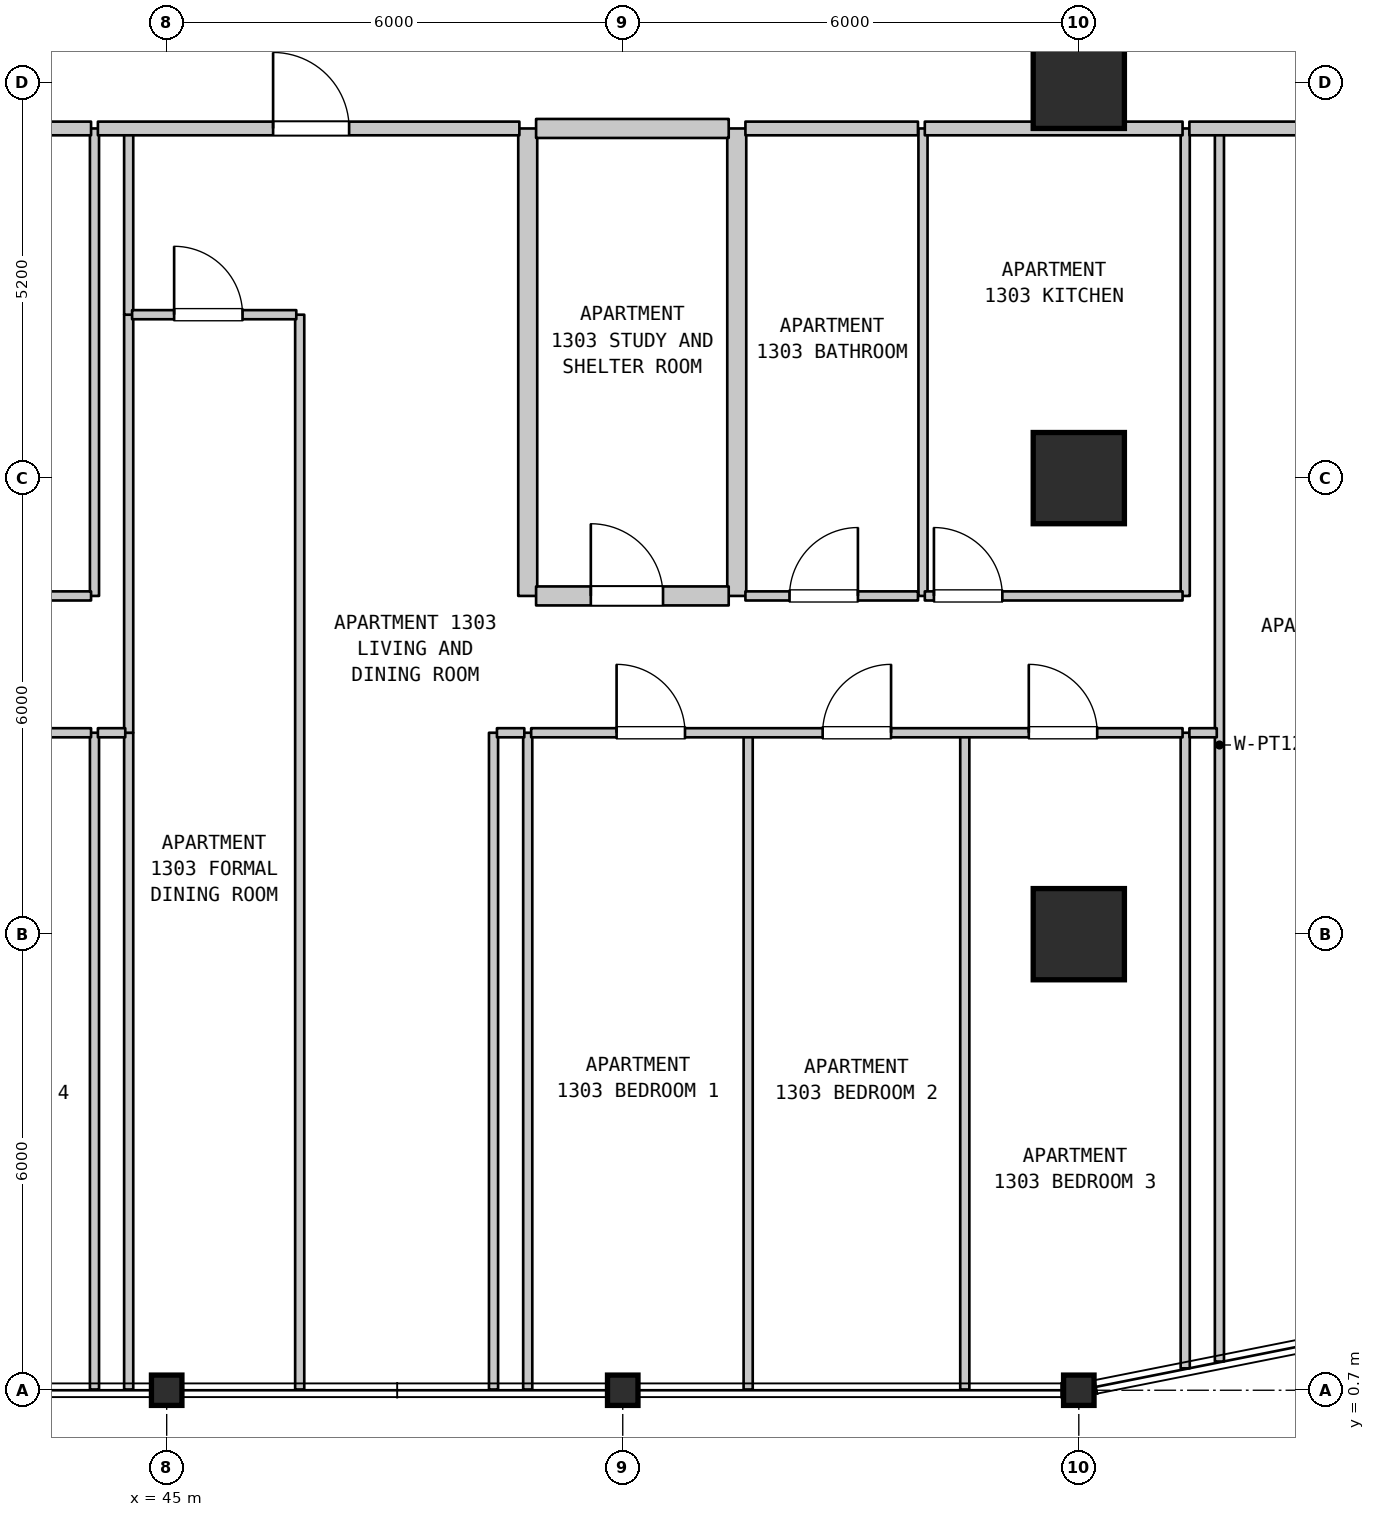
"""IFC4 building model, lengths in metres.
Left out: names, types, materials, properties, quantities, classifications, styles, units other than length and angle.
Written with IfcOpenShell. Run it as: python <this file> out.ifc"""

import sys

from ifc_helpers import new_model, si_unit, direction, frame, frame_2d, origin, origin_2d, place, context, subcontext, project, spatial, rectangle, i_section, extrude, element, fill, save


model = new_model("IFC4")
c1 = context("Model", 3, precision=1e-05, world=origin(), true_north=direction((0.0, 1.0)))
c2 = subcontext(c1, "Body", "Model", "MODEL_VIEW")
j1 = project(units=[si_unit("LENGTHUNIT", "METRE"), si_unit("PLANEANGLEUNIT", "RADIAN")], contexts=[c1])
p1 = place(None, origin())
s1 = spatial("IfcSite", under=j1, at=p1, CompositionType="ELEMENT")
p2 = place(p1, origin())
s2 = spatial("IfcBuilding", under=s1, at=p2, CompositionType="ELEMENT")
p3 = place(p2, frame((0.0, 0.0, 57.3)))
s3 = spatial("IfcBuildingStorey", under=s2, at=p3, CompositionType="ELEMENT", Elevation=57.3)
for number, where, z_axis, x_axis in (
    (1, (45.0, 0.7, 0.0), (0.0, 0.0, 1.0), (1.0, 0.0, 0.0)),
    (2, (51.0, 0.7, 0.0), (0.0, 0.0, 1.0), (1.0, 0.0, 0.0)),
    (3, (57.0, 0.7, 0.0), (0.0, 0.0, 1.0), (1.0, 0.0, 0.0)),
):
    element("IfcColumn", number, at=place(p3, frame(where, z_axis=z_axis, x_axis=x_axis)), inside=s3, PredefinedType="COLUMN", context=c2, shape_type="SweptSolid", body=[
        extrude(i_section(OverallWidth=0.401, OverallDepth=0.399, WebThickness=0.025, FlangeThickness=0.04, FilletRadius=0.015, at=origin_2d()), origin(), (0.0, 0.0, 1.0), 3.7),
    ])
for number, where, z_axis, x_axis in (
    (4, (57.0, 6.7, 0.0), (0.0, 0.0, 1.0), (1.0, 0.0, 0.0)),
    (5, (57.0, 12.7, 0.0), (0.0, 0.0, 1.0), (1.0, 0.0, 0.0)),
    (6, (57.0, 17.9, 0.0), (0.0, 0.0, 1.0), (1.0, 0.0, 0.0)),
):
    element("IfcColumn", number, at=place(p3, frame(where, z_axis=z_axis, x_axis=x_axis)), inside=s3, PredefinedType="COLUMN", context=c2, shape_type="SweptSolid", body=[
        extrude(rectangle(XDim=1.2, YDim=1.2, at=origin_2d()), origin(), (0.0, 0.0, 1.0), 3.7),
    ])
p4 = place(p3, frame((44.05, 0.71, 0.0), z_axis=(0.0, 0.0, 1.0), x_axis=(0.0, 1.0, 0.0)))
e7 = element("IfcWall", 7, at=p4, inside=s3, PredefinedType="PARTITIONING", context=c2, shape_type="SweptSolid", body=[
    extrude(rectangle(XDim=8.64, YDim=0.12, at=frame_2d((4.32, 0.0))), origin(), (0.0, 0.0, 1.0), 3.28),
])
p5 = place(p3, frame((44.05, 11.15, 0.0), z_axis=(0.0, 0.0, 1.0), x_axis=(0.0, 1.0, 0.0)))
e8 = element("IfcWall", 8, at=p5, inside=s3, PredefinedType="PARTITIONING", context=c2, shape_type="SweptSolid", body=[
    extrude(rectangle(XDim=6.15, YDim=0.12, at=frame_2d((3.075, 0.0))), origin(), (0.0, 0.0, 1.0), 3.28),
])
p6 = place(p3, frame((44.5, 0.71, 0.0), z_axis=(0.0, 0.0, 1.0), x_axis=(0.0, 1.0, 0.0)))
e9 = element("IfcWall", 9, at=p6, inside=s3, PredefinedType="PARTITIONING", context=c2, shape_type="SweptSolid", body=[
    extrude(rectangle(XDim=8.64, YDim=0.12, at=frame_2d((4.32, 0.0))), origin(), (0.0, 0.0, 1.0), 3.28),
])
p7 = place(p3, frame((44.5, 9.35, 0.0), z_axis=(0.0, 0.0, 1.0), x_axis=(0.0, 1.0, 0.0)))
e10 = element("IfcWall", 10, at=p7, inside=s3, PredefinedType="PARTITIONING", context=c2, shape_type="SweptSolid", body=[
    extrude(rectangle(XDim=5.5, YDim=0.12, at=frame_2d((2.75, 0.0))), origin(), (0.0, 0.0, 1.0), 3.28),
])
p8 = place(p3, frame((44.5, 14.85, 0.0), z_axis=(0.0, 0.0, 1.0), x_axis=(0.0, 1.0, 0.0)))
e11 = element("IfcWall", 11, at=p8, inside=s3, PredefinedType="PARTITIONING", context=c2, shape_type="SweptSolid", body=[
    extrude(rectangle(XDim=2.45, YDim=0.12, at=frame_2d((1.225, 0.0))), origin(), (0.0, 0.0, 1.0), 3.28),
])
p9 = place(p3, frame((46.75, 0.71, 0.0), z_axis=(0.0, 0.0, 1.0), x_axis=(0.0, 1.0, 0.0)))
e12 = element("IfcWall", 12, at=p9, inside=s3, PredefinedType="PARTITIONING", context=c2, shape_type="SweptSolid", body=[
    extrude(rectangle(XDim=14.14, YDim=0.12, at=frame_2d((7.07, 0.0))), origin(), (0.0, 0.0, 1.0), 3.28),
])
for number, where, z_axis, x_axis in (
    (13, (49.3, 0.71, 0.0), (0.0, 0.0, 1.0), (0.0, 1.0, 0.0)),
    (14, (49.75, 0.71, 0.0), (0.0, 0.0, 1.0), (0.0, 1.0, 0.0)),
):
    element("IfcWall", number, at=place(p3, frame(where, z_axis=z_axis, x_axis=x_axis)), inside=s3, PredefinedType="PARTITIONING", context=c2, shape_type="SweptSolid", body=[
        extrude(rectangle(XDim=8.64, YDim=0.12, at=frame_2d((4.32, 0.0))), origin(), (0.0, 0.0, 1.0), 3.28),
    ])
for number, where, z_axis, x_axis in (
    (15, (49.75, 11.15, 0.0), (0.0, 0.0, 1.0), (0.0, 1.0, 0.0)),
    (16, (52.5, 11.15, 0.0), (0.0, 0.0, 1.0), (0.0, 1.0, 0.0)),
):
    element("IfcWall", number, at=place(p3, frame(where, z_axis=z_axis, x_axis=x_axis)), inside=s3, PredefinedType="STANDARD", context=c2, shape_type="SweptSolid", body=[
        extrude(rectangle(XDim=6.15, YDim=0.25, at=frame_2d((3.075, 0.0))), origin(), (0.0, 0.0, 1.0), 3.28),
    ])
p10 = place(p3, frame((52.65, 0.71, 0.0), z_axis=(0.0, 0.0, 1.0), x_axis=(0.0, 1.0, 0.0)))
e17 = element("IfcWall", 17, at=p10, inside=s3, PredefinedType="PARTITIONING", context=c2, shape_type="SweptSolid", body=[
    extrude(rectangle(XDim=8.64, YDim=0.12, at=frame_2d((4.32, 0.0))), origin(), (0.0, 0.0, 1.0), 3.28),
])
p11 = place(p3, frame((54.95, 11.15, 0.0), z_axis=(0.0, 0.0, 1.0), x_axis=(0.0, 1.0, 0.0)))
e18 = element("IfcWall", 18, at=p11, inside=s3, PredefinedType="PARTITIONING", context=c2, shape_type="SweptSolid", body=[
    extrude(rectangle(XDim=6.15, YDim=0.12, at=frame_2d((3.075, 0.0))), origin(), (0.0, 0.0, 1.0), 3.28),
])
p12 = place(p3, frame((55.5, 0.71, 0.0), z_axis=(0.0, 0.0, 1.0), x_axis=(0.0, 1.0, 0.0)))
e19 = element("IfcWall", 19, at=p12, inside=s3, PredefinedType="PARTITIONING", context=c2, shape_type="SweptSolid", body=[
    extrude(rectangle(XDim=8.64, YDim=0.12, at=frame_2d((4.32, 0.0))), origin(), (0.0, 0.0, 1.0), 3.28),
])
p13 = place(p3, frame((58.4, 0.988, 0.0), z_axis=(0.0, 0.0, 1.0), x_axis=(0.0, 1.0, 0.0)))
e20 = element("IfcWall", 20, at=p13, inside=s3, PredefinedType="PARTITIONING", context=c2, shape_type="SweptSolid", body=[
    extrude(rectangle(XDim=8.362, YDim=0.12, at=frame_2d((4.181, 0.0))), origin(), (0.0, 0.0, 1.0), 3.28),
])
p14 = place(p3, frame((58.4, 11.15, 0.0), z_axis=(0.0, 0.0, 1.0), x_axis=(0.0, 1.0, 0.0)))
e21 = element("IfcWall", 21, at=p14, inside=s3, PredefinedType="PARTITIONING", context=c2, shape_type="SweptSolid", body=[
    extrude(rectangle(XDim=6.15, YDim=0.12, at=frame_2d((3.075, 0.0))), origin(), (0.0, 0.0, 1.0), 3.28),
])
p15 = place(p3, frame((58.85, 1.078, 0.0), z_axis=(0.0, 0.0, 1.0), x_axis=(0.0, 1.0, 0.0)))
e22 = element("IfcWall", 22, at=p15, inside=s3, PredefinedType="PARTITIONING", context=c2, shape_type="SweptSolid", body=[
    extrude(rectangle(XDim=16.222, YDim=0.12, at=frame_2d((8.111, 0.0))), origin(), (0.0, 0.0, 1.0), 3.28),
])
p16 = place(p3, frame((32.895, 9.35, 0.0), z_axis=(0.0, 0.0, 1.0), x_axis=(1.0, 0.0, 0.0)))
e23 = element("IfcWall", 23, at=p16, inside=s3, PredefinedType="PARTITIONING", context=c2, shape_type="SweptSolid", body=[
    extrude(rectangle(XDim=11.11, YDim=0.12, at=frame_2d((5.555, 0.0))), origin(), (0.0, 0.0, 1.0), 3.28),
])
p17 = place(p16, frame((1.006, 0.0, 0.0)))
e24 = element("IfcOpeningElement", 24, at=p17, cuts=e23, PredefinedType="OPENING", context=c2, shape_type="SweptSolid", body=[
    extrude(rectangle(XDim=0.9, YDim=2.15, at=frame_2d((0.45, 1.075))), frame((0.0, 0.07, 0.0), z_axis=(0.0, -1.0, 0.0), x_axis=(1.0, 0.0, 0.0)), (0.0, 0.0, 1.0), 0.14),
])
p18 = place(p16, frame((3.705, 0.0, 0.0)))
e25 = element("IfcOpeningElement", 25, at=p18, cuts=e23, PredefinedType="OPENING", context=c2, shape_type="SweptSolid", body=[
    extrude(rectangle(XDim=0.9, YDim=2.15, at=frame_2d((0.45, 1.075))), frame((0.0, 0.07, 0.0), z_axis=(0.0, -1.0, 0.0), x_axis=(1.0, 0.0, 0.0)), (0.0, 0.0, 1.0), 0.14),
])
p19 = place(p16, frame((6.505, 0.0, 0.0)))
e26 = element("IfcOpeningElement", 26, at=p19, cuts=e23, PredefinedType="OPENING", context=c2, shape_type="SweptSolid", body=[
    extrude(rectangle(XDim=0.9, YDim=2.15, at=frame_2d((0.45, 1.075))), frame((0.0, 0.07, 0.0), z_axis=(0.0, -1.0, 0.0), x_axis=(1.0, 0.0, 0.0)), (0.0, 0.0, 1.0), 0.14),
])
p20 = place(p16, frame((9.056, 0.0, 0.0)))
e27 = element("IfcOpeningElement", 27, at=p20, cuts=e23, PredefinedType="OPENING", context=c2, shape_type="SweptSolid", body=[
    extrude(rectangle(XDim=0.9, YDim=2.15, at=frame_2d((0.45, 1.075))), frame((0.0, 0.07, 0.0), z_axis=(0.0, -1.0, 0.0), x_axis=(1.0, 0.0, 0.0)), (0.0, 0.0, 1.0), 0.14),
])
for number, where, z_axis, x_axis in (
    (28, (44.095, 9.35, 0.0), (0.0, 0.0, 1.0), (1.0, 0.0, 0.0)),
    (29, (49.345, 9.35, 0.0), (0.0, 0.0, 1.0), (1.0, 0.0, 0.0)),
):
    element("IfcWall", number, at=place(p3, frame(where, z_axis=z_axis, x_axis=x_axis)), inside=s3, PredefinedType="PARTITIONING", context=c2, shape_type="SweptSolid", body=[
        extrude(rectangle(XDim=0.36, YDim=0.12, at=frame_2d((0.18, 0.0))), origin(), (0.0, 0.0, 1.0), 3.28),
    ])
p21 = place(p3, frame((49.795, 9.35, 0.0), z_axis=(0.0, 0.0, 1.0), x_axis=(1.0, 0.0, 0.0)))
e30 = element("IfcWall", 30, at=p21, inside=s3, PredefinedType="PARTITIONING", context=c2, shape_type="SweptSolid", body=[
    extrude(rectangle(XDim=8.57, YDim=0.12, at=frame_2d((4.285, 0.0))), origin(), (0.0, 0.0, 1.0), 3.28),
])
p22 = place(p21, frame((1.124, 0.0, 0.0)))
e31 = element("IfcOpeningElement", 31, at=p22, cuts=e30, PredefinedType="OPENING", context=c2, shape_type="SweptSolid", body=[
    extrude(rectangle(XDim=0.9, YDim=2.15, at=frame_2d((0.45, 1.075))), frame((0.0, 0.07, 0.0), z_axis=(0.0, -1.0, 0.0), x_axis=(1.0, 0.0, 0.0)), (0.0, 0.0, 1.0), 0.14),
])
p23 = place(p21, frame((3.835, 0.0, 0.0)))
e32 = element("IfcOpeningElement", 32, at=p23, cuts=e30, PredefinedType="OPENING", context=c2, shape_type="SweptSolid", body=[
    extrude(rectangle(XDim=0.9, YDim=2.15, at=frame_2d((0.45, 1.075))), frame((0.0, 0.07, 0.0), z_axis=(0.0, -1.0, 0.0), x_axis=(1.0, 0.0, 0.0)), (0.0, 0.0, 1.0), 0.14),
])
p24 = place(p21, frame((6.547, 0.0, 0.0)))
e33 = element("IfcOpeningElement", 33, at=p24, cuts=e30, PredefinedType="OPENING", context=c2, shape_type="SweptSolid", body=[
    extrude(rectangle(XDim=0.9, YDim=2.15, at=frame_2d((0.45, 1.075))), frame((0.0, 0.07, 0.0), z_axis=(0.0, -1.0, 0.0), x_axis=(1.0, 0.0, 0.0)), (0.0, 0.0, 1.0), 0.14),
])
p25 = place(p3, frame((58.455, 9.35, 0.0), z_axis=(0.0, 0.0, 1.0), x_axis=(1.0, 0.0, 0.0)))
e34 = element("IfcWall", 34, at=p25, inside=s3, PredefinedType="PARTITIONING", context=c2, shape_type="SweptSolid", body=[
    extrude(rectangle(XDim=0.36, YDim=0.12, at=frame_2d((0.18, 0.0))), origin(), (0.0, 0.0, 1.0), 3.28),
])
p26 = place(p3, frame((40.959, 11.15, 0.0), z_axis=(0.0, 0.0, 1.0), x_axis=(1.0, 0.0, 0.0)))
e35 = element("IfcWall", 35, at=p26, inside=s3, PredefinedType="PARTITIONING", context=c2, shape_type="SweptSolid", body=[
    extrude(rectangle(XDim=3.046, YDim=0.12, at=frame_2d((1.523, 0.0))), origin(), (0.0, 0.0, 1.0), 3.28),
])
p27 = place(p26, frame((1.073, 0.0, 0.0)))
e36 = element("IfcOpeningElement", 36, at=p27, cuts=e35, PredefinedType="OPENING", context=c2, shape_type="SweptSolid", body=[
    extrude(rectangle(XDim=0.9, YDim=2.1, at=frame_2d((0.45, 1.05))), frame((0.0, 0.07, 0.0), z_axis=(0.0, -1.0, 0.0), x_axis=(1.0, 0.0, 0.0)), (0.0, 0.0, 1.0), 0.14),
])
p28 = place(p3, frame((49.86, 11.15, 0.0), z_axis=(0.0, 0.0, 1.0), x_axis=(1.0, 0.0, 0.0)))
e37 = element("IfcWall", 37, at=p28, inside=s3, PredefinedType="STANDARD", context=c2, shape_type="SweptSolid", body=[
    extrude(rectangle(XDim=2.534, YDim=0.25, at=frame_2d((1.267, 0.0))), origin(), (0.0, 0.0, 1.0), 3.28),
])
p29 = place(p28, frame((0.72, 0.0, 0.0)))
e38 = element("IfcOpeningElement", 38, at=p29, cuts=e37, PredefinedType="OPENING", context=c2, shape_type="SweptSolid", body=[
    extrude(rectangle(XDim=0.95, YDim=2.15, at=frame_2d((0.475, 1.075))), frame((0.0, 0.135, 0.0), z_axis=(0.0, -1.0, 0.0), x_axis=(1.0, 0.0, 0.0)), (0.0, 0.0, 1.0), 0.27),
])
p30 = place(p3, frame((52.614, 11.15, 0.0), z_axis=(0.0, 0.0, 1.0), x_axis=(1.0, 0.0, 0.0)))
e39 = element("IfcWall", 39, at=p30, inside=s3, PredefinedType="PARTITIONING", context=c2, shape_type="SweptSolid", body=[
    extrude(rectangle(XDim=2.27, YDim=0.12, at=frame_2d((1.135, 0.0))), origin(), (0.0, 0.0, 1.0), 3.28),
])
p31 = place(p30, frame((0.58, 0.0, 0.0)))
e40 = element("IfcOpeningElement", 40, at=p31, cuts=e39, PredefinedType="OPENING", context=c2, shape_type="SweptSolid", body=[
    extrude(rectangle(XDim=0.9, YDim=2.1, at=frame_2d((0.45, 1.05))), frame((0.0, 0.07, 0.0), z_axis=(0.0, -1.0, 0.0), x_axis=(1.0, 0.0, 0.0)), (0.0, 0.0, 1.0), 0.14),
])
p32 = place(p3, frame((54.974, 11.15, 0.0), z_axis=(0.0, 0.0, 1.0), x_axis=(1.0, 0.0, 0.0)))
e41 = element("IfcWall", 41, at=p32, inside=s3, PredefinedType="PARTITIONING", context=c2, shape_type="SweptSolid", body=[
    extrude(rectangle(XDim=3.391, YDim=0.12, at=frame_2d((1.695, 0.0))), origin(), (0.0, 0.0, 1.0), 3.28),
])
p33 = place(p32, frame((0.12, 0.0, 0.0)))
e42 = element("IfcOpeningElement", 42, at=p33, cuts=e41, PredefinedType="OPENING", context=c2, shape_type="SweptSolid", body=[
    extrude(rectangle(XDim=0.9, YDim=2.15, at=frame_2d((0.45, 1.075))), frame((0.0, 0.07, 0.0), z_axis=(0.0, -1.0, 0.0), x_axis=(1.0, 0.0, 0.0)), (0.0, 0.0, 1.0), 0.14),
])
p34 = place(p3, frame((44.545, 14.85, 0.0), z_axis=(0.0, 0.0, 1.0), x_axis=(1.0, 0.0, 0.0)))
e43 = element("IfcWall", 43, at=p34, inside=s3, PredefinedType="PARTITIONING", context=c2, shape_type="SweptSolid", body=[
    extrude(rectangle(XDim=2.16, YDim=0.12, at=frame_2d((1.08, 0.0))), origin(), (0.0, 0.0, 1.0), 3.28),
])
p35 = place(p34, frame((0.553, 0.0, 0.0)))
e44 = element("IfcOpeningElement", 44, at=p35, cuts=e43, PredefinedType="OPENING", context=c2, shape_type="SweptSolid", body=[
    extrude(rectangle(XDim=0.9, YDim=2.15, at=frame_2d((0.45, 1.075))), frame((0.0, 0.07, 0.0), z_axis=(0.0, -1.0, 0.0), x_axis=(1.0, 0.0, 0.0)), (0.0, 0.0, 1.0), 0.14),
])
p36 = place(p3, frame((40.959, 17.3, 0.0), z_axis=(0.0, 0.0, 1.0), x_axis=(1.0, 0.0, 0.0)))
e45 = element("IfcWall", 45, at=p36, inside=s3, PredefinedType="STANDARD", context=c2, shape_type="SweptSolid", body=[
    extrude(rectangle(XDim=3.046, YDim=0.18, at=frame_2d((1.523, 0.0))), origin(), (0.0, 0.0, 1.0), 3.28),
])
p37 = place(p3, frame((44.095, 17.3, 0.0), z_axis=(0.0, 0.0, 1.0), x_axis=(1.0, 0.0, 0.0)))
e46 = element("IfcWall", 46, at=p37, inside=s3, PredefinedType="STANDARD", context=c2, shape_type="SweptSolid", body=[
    extrude(rectangle(XDim=5.545, YDim=0.18, at=frame_2d((2.772, 0.0))), origin(), (0.0, 0.0, 1.0), 3.28),
])
p38 = place(p37, frame((2.305, 0.0, 0.0)))
e47 = element("IfcOpeningElement", 47, at=p38, cuts=e46, PredefinedType="OPENING", context=c2, shape_type="SweptSolid", body=[
    extrude(rectangle(XDim=1.0, YDim=2.15, at=frame_2d((0.5, 1.075))), frame((0.0, 0.1, 0.0), z_axis=(0.0, -1.0, 0.0), x_axis=(1.0, 0.0, 0.0)), (0.0, 0.0, 1.0), 0.2),
])
p39 = place(p3, frame((49.86, 17.3, 0.0), z_axis=(0.0, 0.0, 1.0), x_axis=(1.0, 0.0, 0.0)))
e48 = element("IfcWall", 48, at=p39, inside=s3, PredefinedType="STANDARD", context=c2, shape_type="SweptSolid", body=[
    extrude(rectangle(XDim=2.534, YDim=0.25, at=frame_2d((1.267, 0.0))), origin(), (0.0, 0.0, 1.0), 3.28),
])
p40 = place(p3, frame((52.614, 17.3, 0.0), z_axis=(0.0, 0.0, 1.0), x_axis=(1.0, 0.0, 0.0)))
e49 = element("IfcWall", 49, at=p40, inside=s3, PredefinedType="STANDARD", context=c2, shape_type="SweptSolid", body=[
    extrude(rectangle(XDim=2.27, YDim=0.18, at=frame_2d((1.135, 0.0))), origin(), (0.0, 0.0, 1.0), 3.28),
])
p41 = place(p3, frame((54.974, 17.3, 0.0), z_axis=(0.0, 0.0, 1.0), x_axis=(1.0, 0.0, 0.0)))
e50 = element("IfcWall", 50, at=p41, inside=s3, PredefinedType="STANDARD", context=c2, shape_type="SweptSolid", body=[
    extrude(rectangle(XDim=3.391, YDim=0.18, at=frame_2d((1.695, 0.0))), origin(), (0.0, 0.0, 1.0), 3.28),
])
p42 = place(p3, frame((58.455, 17.3, 0.0), z_axis=(0.0, 0.0, 1.0), x_axis=(1.0, 0.0, 0.0)))
e51 = element("IfcWall", 51, at=p42, inside=s3, PredefinedType="STANDARD", context=c2, shape_type="SweptSolid", body=[
    extrude(rectangle(XDim=4.65, YDim=0.18, at=frame_2d((2.325, 0.0))), origin(), (0.0, 0.0, 1.0), 3.28),
])
p43 = place(p42, frame((2.025, 0.0, 0.0)))
e52 = element("IfcOpeningElement", 52, at=p43, cuts=e51, PredefinedType="OPENING", context=c2, shape_type="SweptSolid", body=[
    extrude(rectangle(XDim=1.0, YDim=2.15, at=frame_2d((0.5, 1.075))), frame((0.0, 0.1, 0.0), z_axis=(0.0, -1.0, 0.0), x_axis=(1.0, 0.0, 0.0)), (0.0, 0.0, 1.0), 0.2),
])
p44 = place(p22, origin())
e53 = element("IfcDoor", 53, at=p44, inside=s3, OperationType="SINGLE_SWING_LEFT", PredefinedType="DOOR", context=c2, shape_type="SweptSolid", body=[
    extrude(rectangle(XDim=0.9, YDim=2.15, at=frame_2d((0.45, 1.075))), frame((0.0, 0.025, 0.0), z_axis=(0.0, -1.0, 0.0), x_axis=(1.0, 0.0, 0.0)), (0.0, 0.0, 1.0), 0.05),
])
fill(e31, e53)
p45 = place(p23, origin())
e54 = element("IfcDoor", 54, at=p45, inside=s3, OperationType="SINGLE_SWING_RIGHT", PredefinedType="DOOR", context=c2, shape_type="SweptSolid", body=[
    extrude(rectangle(XDim=0.9, YDim=2.15, at=frame_2d((0.45, 1.075))), frame((0.0, 0.025, 0.0), z_axis=(0.0, -1.0, 0.0), x_axis=(1.0, 0.0, 0.0)), (0.0, 0.0, 1.0), 0.05),
])
fill(e32, e54)
p46 = place(p24, origin())
e55 = element("IfcDoor", 55, at=p46, inside=s3, OperationType="SINGLE_SWING_LEFT", PredefinedType="DOOR", context=c2, shape_type="SweptSolid", body=[
    extrude(rectangle(XDim=0.9, YDim=2.15, at=frame_2d((0.45, 1.075))), frame((0.0, 0.025, 0.0), z_axis=(0.0, -1.0, 0.0), x_axis=(1.0, 0.0, 0.0)), (0.0, 0.0, 1.0), 0.05),
])
fill(e33, e55)
p47 = place(p29, origin())
e56 = element("IfcDoor", 56, at=p47, inside=s3, OperationType="SINGLE_SWING_LEFT", PredefinedType="DOOR", context=c2, shape_type="SweptSolid", body=[
    extrude(rectangle(XDim=0.95, YDim=2.15, at=frame_2d((0.475, 1.075))), frame((0.0, 0.025, 0.0), z_axis=(0.0, -1.0, 0.0), x_axis=(1.0, 0.0, 0.0)), (0.0, 0.0, 1.0), 0.05),
])
fill(e38, e56)
p48 = place(p31, origin())
e57 = element("IfcDoor", 57, at=p48, inside=s3, OperationType="SINGLE_SWING_RIGHT", PredefinedType="DOOR", context=c2, shape_type="SweptSolid", body=[
    extrude(rectangle(XDim=0.9, YDim=2.1, at=frame_2d((0.45, 1.05))), frame((0.0, 0.025, 0.0), z_axis=(0.0, -1.0, 0.0), x_axis=(1.0, 0.0, 0.0)), (0.0, 0.0, 1.0), 0.05),
])
fill(e40, e57)
p49 = place(p33, origin())
e58 = element("IfcDoor", 58, at=p49, inside=s3, OperationType="SINGLE_SWING_LEFT", PredefinedType="DOOR", context=c2, shape_type="SweptSolid", body=[
    extrude(rectangle(XDim=0.9, YDim=2.15, at=frame_2d((0.45, 1.075))), frame((0.0, 0.025, 0.0), z_axis=(0.0, -1.0, 0.0), x_axis=(1.0, 0.0, 0.0)), (0.0, 0.0, 1.0), 0.05),
])
fill(e42, e58)
p50 = place(p35, origin())
e59 = element("IfcDoor", 59, at=p50, inside=s3, OperationType="SINGLE_SWING_LEFT", PredefinedType="DOOR", context=c2, shape_type="SweptSolid", body=[
    extrude(rectangle(XDim=0.9, YDim=2.15, at=frame_2d((0.45, 1.075))), frame((0.0, 0.025, 0.0), z_axis=(0.0, -1.0, 0.0), x_axis=(1.0, 0.0, 0.0)), (0.0, 0.0, 1.0), 0.05),
])
fill(e44, e59)
p51 = place(p38, origin())
e60 = element("IfcDoor", 60, at=p51, inside=s3, OperationType="SINGLE_SWING_LEFT", PredefinedType="DOOR", context=c2, shape_type="SweptSolid", body=[
    extrude(rectangle(XDim=1.0, YDim=2.15, at=frame_2d((0.5, 1.075))), frame((0.0, 0.025, 0.0), z_axis=(0.0, -1.0, 0.0), x_axis=(1.0, 0.0, 0.0)), (0.0, 0.0, 1.0), 0.05),
])
fill(e47, e60)
save(model, sys.argv[1])
